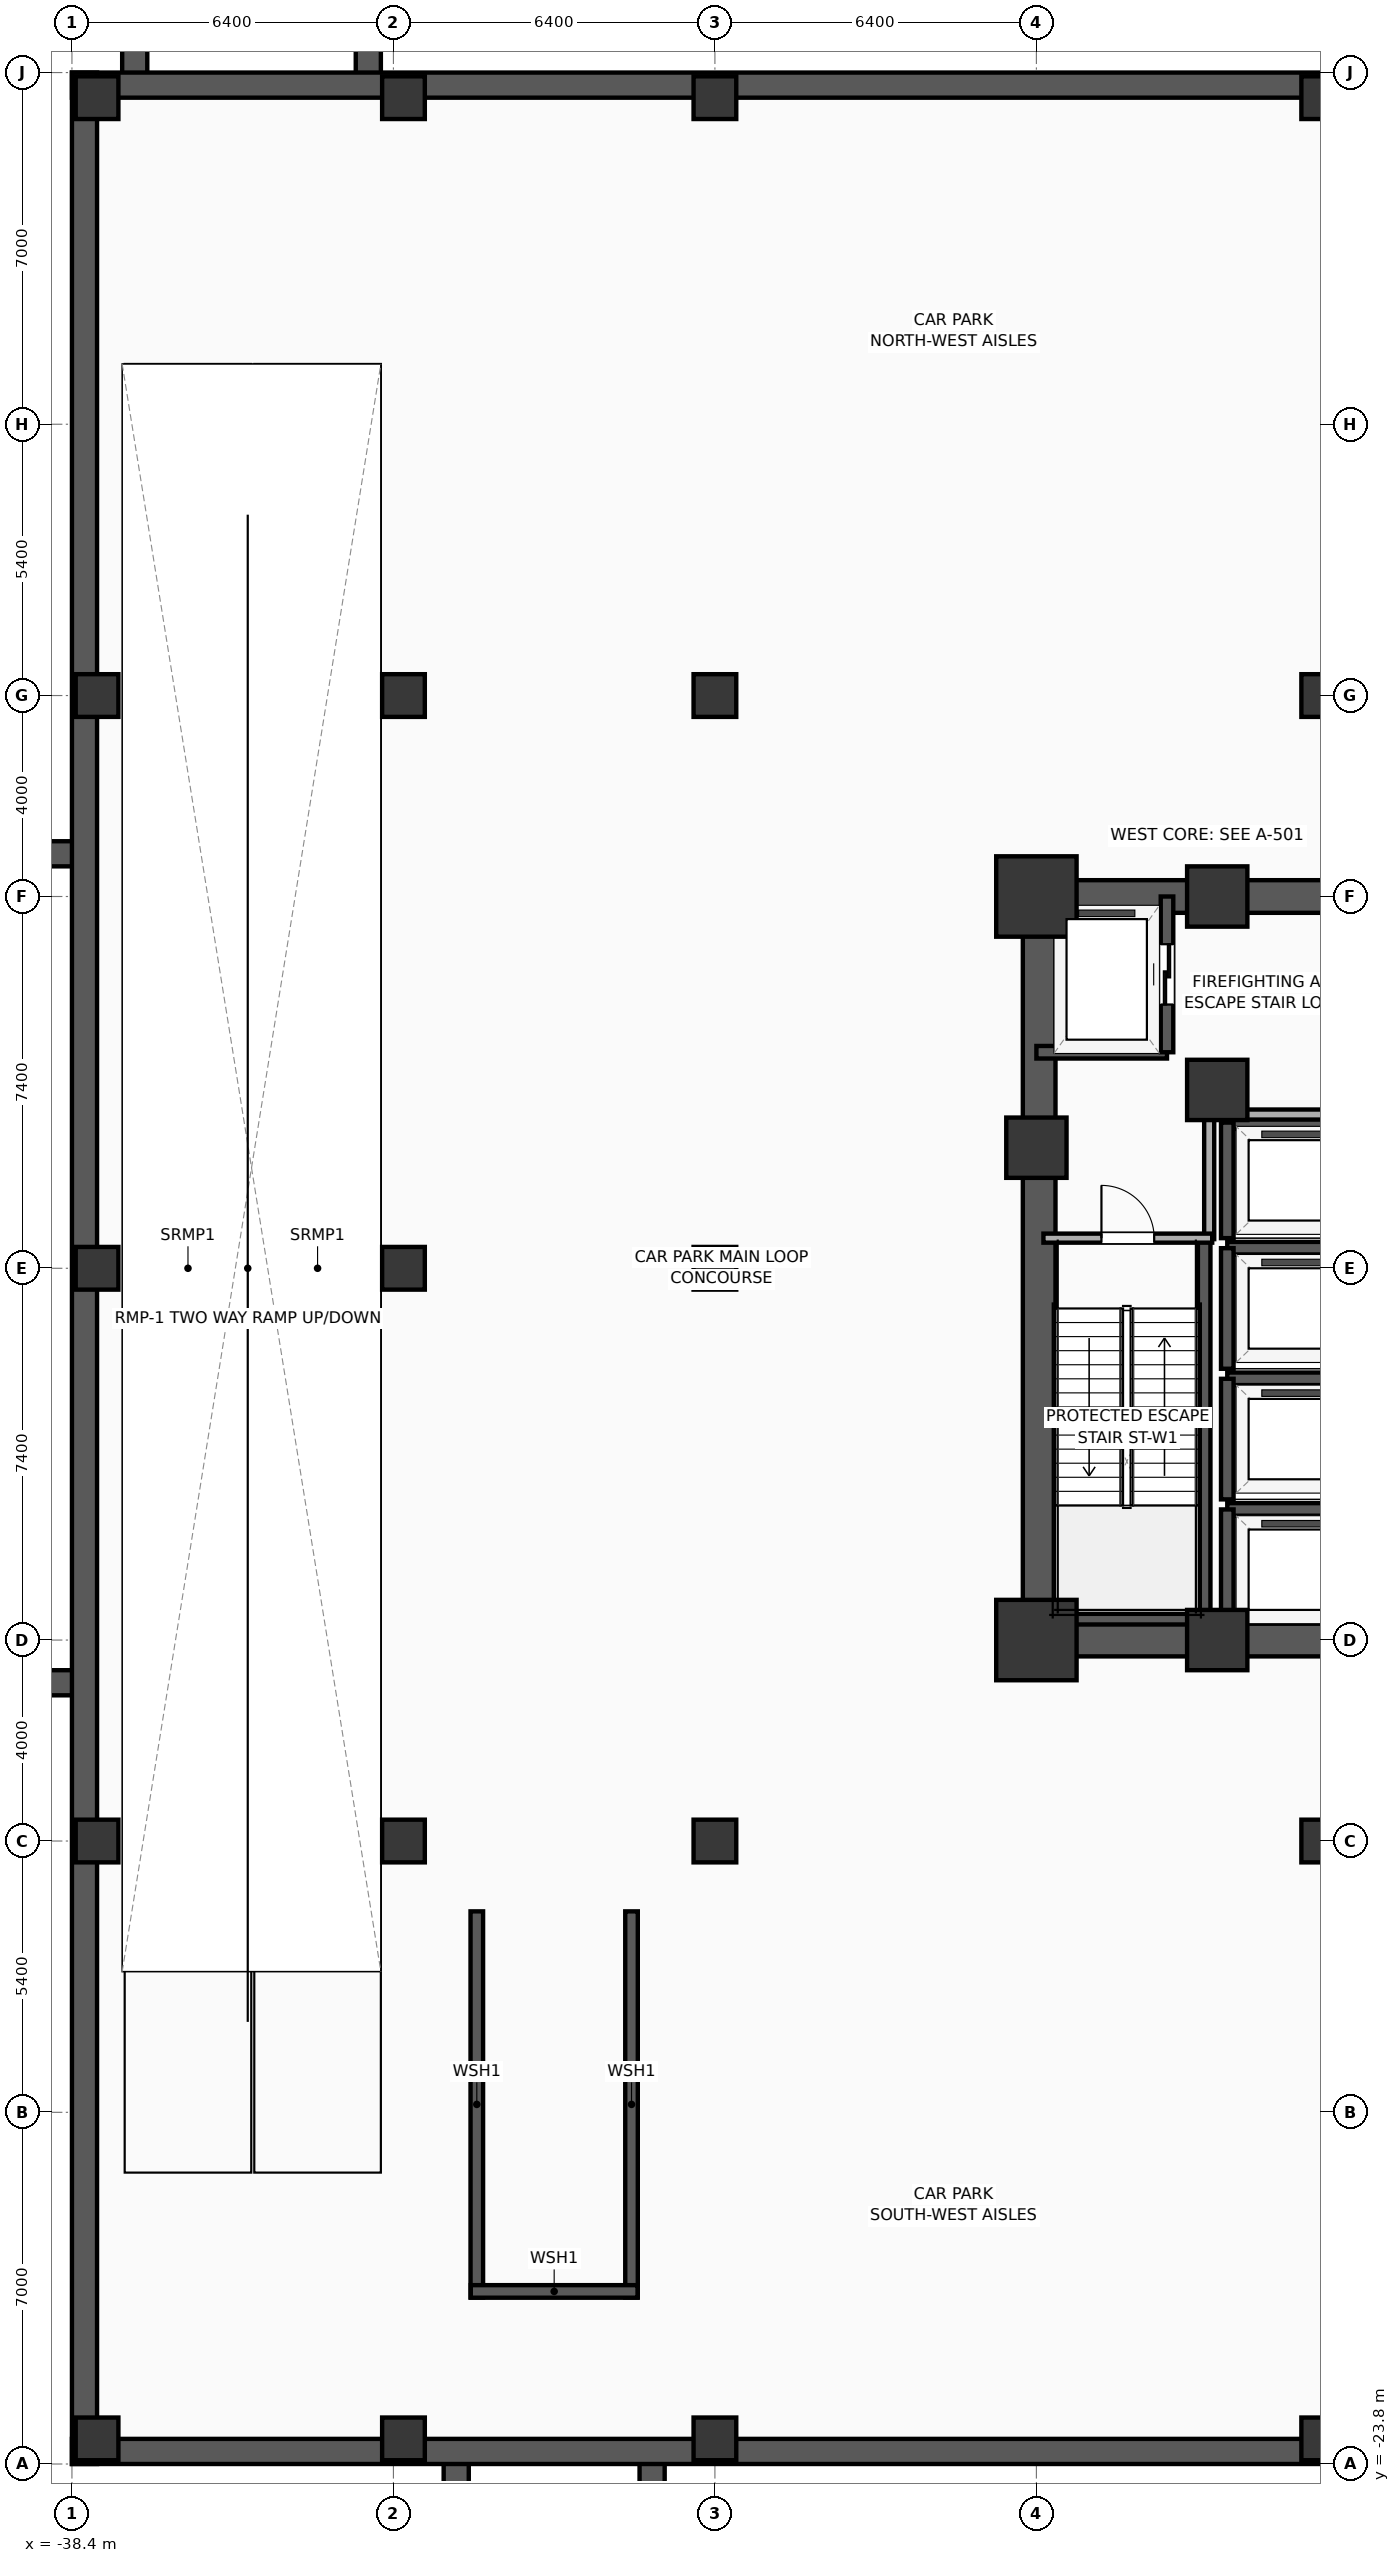
"""IFC4 building model, lengths in metres.
Left out: names, types, materials, properties, quantities, classifications, styles, units other than length and angle.
Written with IfcOpenShell. Run it as: python <this file> out.ifc"""

import sys

from ifc_helpers import new_model, si_unit, direction, frame, frame_2d, origin, origin_2d, place, context, subcontext, project, spatial, rectangle, extrude, element, fill, save


model = new_model("IFC4")
c1 = context("Model", 3, precision=1e-05, world=origin(), true_north=direction((0.0, 1.0)))
c2 = subcontext(c1, "Body", "Model", "MODEL_VIEW")
j1 = project(units=[si_unit("LENGTHUNIT", "METRE"), si_unit("PLANEANGLEUNIT", "RADIAN")], contexts=[c1])
p1 = place(None, origin())
s1 = spatial("IfcSite", under=j1, at=p1, CompositionType="ELEMENT")
p2 = place(p1, origin())
s2 = spatial("IfcBuilding", under=s1, at=p2, CompositionType="ELEMENT")
p3 = place(p2, frame((0.0, 0.0, -5.2)))
s3 = spatial("IfcBuildingStorey", under=s2, at=p3, CompositionType="ELEMENT", Elevation=-5.2)
for number, where, z_axis, x_axis in (
    (1, (-37.15, 23.55, 0.0), (0.0, 0.0, 1.0), (0.0, 1.0, 0.0)),
    (2, (-32.5, 23.55, 0.0), (0.0, 0.0, 1.0), (0.0, 1.0, 0.0)),
):
    element("IfcWall", number, at=place(p3, frame(where, z_axis=z_axis, x_axis=x_axis)), inside=s3, PredefinedType="USERDEFINED", context=c2, shape_type="SweptSolid", body=[
        extrude(rectangle(XDim=3.6, YDim=0.5, at=frame_2d((1.8, 0.0))), origin(), (0.0, 0.0, 1.0), 5.02),
    ])
for number, where, z_axis, x_axis in (
    (3, (-30.75, -26.95, 0.0), (0.0, 0.0, 1.0), (0.0, 1.0, 0.0)),
    (4, (-26.85, -26.95, 0.0), (0.0, 0.0, 1.0), (0.0, 1.0, 0.0)),
):
    element("IfcWall", number, at=place(p3, frame(where, z_axis=z_axis, x_axis=x_axis)), inside=s3, PredefinedType="USERDEFINED", context=c2, shape_type="SweptSolid", body=[
        extrude(rectangle(XDim=3.4, YDim=0.5, at=frame_2d((1.7, 0.0))), origin(), (0.0, 0.0, 1.0), 5.02),
    ])
for number, where, z_axis, x_axis in (
    (5, (-42.35, -8.25, 0.0), (0.0, 0.0, 1.0), (1.0, 0.0, 0.0)),
    (6, (-42.35, 8.25, 0.0), (0.0, 0.0, 1.0), (1.0, 0.0, 0.0)),
):
    element("IfcWall", number, at=place(p3, frame(where, z_axis=z_axis, x_axis=x_axis)), inside=s3, PredefinedType="USERDEFINED", context=c2, shape_type="SweptSolid", body=[
        extrude(rectangle(XDim=4.2, YDim=0.5, at=frame_2d((2.1, 0.0))), origin(), (0.0, 0.0, 1.0), 5.02),
    ])
p4 = place(p3, frame((-19.2, -7.4, 0.0), z_axis=(0.0, 0.0, 1.0), x_axis=(1.0, 0.0, 0.0)))
e7 = element("IfcColumn", 7, at=p4, inside=s3, PredefinedType="COLUMN", context=c2, shape_type="SweptSolid", body=[
    extrude(rectangle(XDim=1.6, YDim=1.6, at=origin_2d()), origin(), (0.0, 0.0, 1.0), 5.2),
])
p5 = place(p3, frame((-19.2, 2.4, 0.0), z_axis=(0.0, 0.0, 1.0), x_axis=(1.0, 0.0, 0.0)))
e8 = element("IfcColumn", 8, at=p5, inside=s3, PredefinedType="COLUMN", context=c2, shape_type="SweptSolid", body=[
    extrude(rectangle(XDim=1.2, YDim=1.2, at=origin_2d()), origin(), (0.0, 0.0, 1.0), 5.2),
])
p6 = place(p3, frame((-19.2, 7.4, 0.0), z_axis=(0.0, 0.0, 1.0), x_axis=(1.0, 0.0, 0.0)))
e9 = element("IfcColumn", 9, at=p6, inside=s3, PredefinedType="COLUMN", context=c2, shape_type="SweptSolid", body=[
    extrude(rectangle(XDim=1.6, YDim=1.6, at=origin_2d()), origin(), (0.0, 0.0, 1.0), 5.2),
])
for number, where, z_axis, x_axis in (
    (10, (-15.6, -7.4, 0.0), (0.0, 0.0, 1.0), (1.0, 0.0, 0.0)),
    (11, (-15.6, 7.4, 0.0), (0.0, 0.0, 1.0), (1.0, 0.0, 0.0)),
    (12, (-15.6, 3.55, 0.0), (0.0, 0.0, 1.0), (1.0, 0.0, 0.0)),
):
    element("IfcColumn", number, at=place(p3, frame(where, z_axis=z_axis, x_axis=x_axis)), inside=s3, PredefinedType="COLUMN", context=c2, shape_type="SweptSolid", body=[
        extrude(rectangle(XDim=1.2, YDim=1.2, at=origin_2d()), origin(), (0.0, 0.0, 1.0), 5.2),
    ])
for number, where, z_axis, x_axis in (
    (13, (-19.525, -7.4, 0.0), (0.0, 0.0, 1.0), (1.0, 0.0, 0.0)),
    (14, (-19.525, 7.4, 0.0), (0.0, 0.0, 1.0), (1.0, 0.0, 0.0)),
):
    element("IfcWall", number, at=place(p3, frame(where, z_axis=z_axis, x_axis=x_axis)), inside=s3, PredefinedType="SHEAR", context=c2, shape_type="SweptSolid", body=[
        extrude(rectangle(XDim=7.45, YDim=0.65, at=frame_2d((3.725, 0.0))), origin(), (0.0, 0.0, 1.0), 4.92),
    ])
p7 = place(p3, frame((-19.145, -7.4, 0.0), z_axis=(0.0, 0.0, 1.0), x_axis=(0.0, 1.0, 0.0)))
e15 = element("IfcWall", 15, at=p7, inside=s3, PredefinedType="SHEAR", context=c2, shape_type="SweptSolid", body=[
    extrude(rectangle(XDim=14.8, YDim=0.65, at=frame_2d((7.4, 0.0))), origin(), (0.0, 0.0, 1.0), 4.92),
])
p8 = place(p3, frame((-15.86, -7.085, 0.0), z_axis=(0.0, 0.0, 1.0), x_axis=(0.0, 1.0, 0.0)))
e16 = element("IfcWall", 16, at=p8, inside=s3, PredefinedType="SOLIDWALL", context=c2, shape_type="SweptSolid", body=[
    extrude(rectangle(XDim=7.685, YDim=0.25, at=frame_2d((3.843, 0.0))), origin(), (0.0, 0.0, 1.0), 4.92),
])
p9 = place(p3, frame((-19.2, -6.965, 0.0), z_axis=(0.0, 0.0, 1.0), x_axis=(1.0, 0.0, 0.0)))
e17 = element("IfcWall", 17, at=p9, inside=s3, PredefinedType="SOLIDWALL", context=c2, shape_type="SweptSolid", body=[
    extrude(rectangle(XDim=3.46, YDim=0.25, at=frame_2d((1.73, 0.0))), origin(), (0.0, 0.0, 1.0), 4.92),
])
for number, where, z_axis, x_axis in (
    (18, (-30.34, -20.485, 0.0), (0.0, 0.0, 1.0), (0.0, 1.0, 0.0)),
    (19, (-27.26, -20.485, 0.0), (0.0, 0.0, 1.0), (0.0, 1.0, 0.0)),
):
    element("IfcWall", number, at=place(p3, frame(where, z_axis=z_axis, x_axis=x_axis)), inside=s3, PredefinedType="SOLIDWALL", context=c2, shape_type="SweptSolid", body=[
        extrude(rectangle(XDim=7.685, YDim=0.25, at=frame_2d((3.843, 0.0))), origin(), (0.0, 0.0, 1.0), 4.92),
    ])
p10 = place(p3, frame((-30.46, -20.365, 0.0), z_axis=(0.0, 0.0, 1.0), x_axis=(1.0, 0.0, 0.0)))
e20 = element("IfcWall", 20, at=p10, inside=s3, PredefinedType="SOLIDWALL", context=c2, shape_type="SweptSolid", body=[
    extrude(rectangle(XDim=3.32, YDim=0.25, at=frame_2d((1.66, 0.0))), origin(), (0.0, 0.0, 1.0), 4.92),
])
for number, where, z_axis, x_axis in (
    (21, (-38.4, -23.55, 0.0), (0.0, 0.0, 1.0), (1.0, 0.0, 0.0)),
    (22, (-38.4, 23.55, 0.0), (0.0, 0.0, 1.0), (1.0, 0.0, 0.0)),
):
    element("IfcWall", number, at=place(p3, frame(where, z_axis=z_axis, x_axis=x_axis)), inside=s3, PredefinedType="USERDEFINED", context=c2, shape_type="SweptSolid", body=[
        extrude(rectangle(XDim=74.0, YDim=0.5, at=frame_2d((37.0, 0.0))), origin(), (0.0, 0.0, 1.0), 4.92),
    ])
p11 = place(p3, frame((-38.15, -23.8, 0.0), z_axis=(0.0, 0.0, 1.0), x_axis=(0.0, 1.0, 0.0)))
e23 = element("IfcWall", 23, at=p11, inside=s3, PredefinedType="USERDEFINED", context=c2, shape_type="SweptSolid", body=[
    extrude(rectangle(XDim=47.6, YDim=0.5, at=frame_2d((23.8, 0.0))), origin(), (0.0, 0.0, 1.0), 4.92),
])
for number, where, z_axis, x_axis in (
    (24, (-37.9, -23.3, 0.0), (0.0, 0.0, 1.0), (1.0, 0.0, 0.0)),
    (25, (-37.9, -11.4, 0.0), (0.0, 0.0, 1.0), (1.0, 0.0, 0.0)),
    (26, (-37.9, 0.0, 0.0), (0.0, 0.0, 1.0), (1.0, 0.0, 0.0)),
    (27, (-37.9, 11.4, 0.0), (0.0, 0.0, 1.0), (1.0, 0.0, 0.0)),
    (28, (-37.9, 23.3, 0.0), (0.0, 0.0, 1.0), (1.0, 0.0, 0.0)),
    (29, (-31.8, -23.3, 0.0), (0.0, 0.0, 1.0), (1.0, 0.0, 0.0)),
    (30, (-31.8, -11.4, 0.0), (0.0, 0.0, 1.0), (1.0, 0.0, 0.0)),
    (31, (-31.8, 0.0, 0.0), (0.0, 0.0, 1.0), (1.0, 0.0, 0.0)),
    (32, (-31.8, 11.4, 0.0), (0.0, 0.0, 1.0), (1.0, 0.0, 0.0)),
    (33, (-31.8, 23.3, 0.0), (0.0, 0.0, 1.0), (1.0, 0.0, 0.0)),
    (34, (-25.6, -23.3, 0.0), (0.0, 0.0, 1.0), (1.0, 0.0, 0.0)),
    (35, (-25.6, -11.4, 0.0), (0.0, 0.0, 1.0), (1.0, 0.0, 0.0)),
    (36, (-25.6, 0.0, 0.0), (0.0, 0.0, 1.0), (1.0, 0.0, 0.0)),
    (37, (-25.6, 11.4, 0.0), (0.0, 0.0, 1.0), (1.0, 0.0, 0.0)),
    (38, (-25.6, 23.3, 0.0), (0.0, 0.0, 1.0), (1.0, 0.0, 0.0)),
    (39, (-13.5, -23.3, 0.0), (0.0, 0.0, 1.0), (1.0, 0.0, 0.0)),
    (40, (-13.5, -11.4, 0.0), (0.0, 0.0, 1.0), (1.0, 0.0, 0.0)),
    (41, (-13.5, 11.4, 0.0), (0.0, 0.0, 1.0), (1.0, 0.0, 0.0)),
    (42, (-13.5, 23.3, 0.0), (0.0, 0.0, 1.0), (1.0, 0.0, 0.0)),
):
    element("IfcColumn", number, at=place(p3, frame(where, z_axis=z_axis, x_axis=x_axis)), inside=s3, PredefinedType="COLUMN", context=c2, shape_type="SweptSolid", body=[
        extrude(rectangle(XDim=0.85, YDim=0.85, at=origin_2d()), origin(), (0.0, 0.0, 1.0), 5.2),
    ])
p12 = place(p3, frame((-19.2, 4.3, 0.0), z_axis=(0.0, 0.0, 1.0), x_axis=(1.0, 0.0, 0.0)))
e43 = element("IfcWall", 43, at=p12, inside=s3, PredefinedType="SOLIDWALL", context=c2, shape_type="SweptSolid", body=[
    extrude(rectangle(XDim=2.6, YDim=0.25, at=frame_2d((1.3, 0.0))), origin(), (0.0, 0.0, 1.0), 4.92),
])
p13 = place(p3, frame((-16.6, 4.3, 0.0), z_axis=(0.0, 0.0, 1.0), x_axis=(0.0, 1.0, 0.0)))
e44 = element("IfcWall", 44, at=p13, inside=s3, PredefinedType="SOLIDWALL", context=c2, shape_type="SweptSolid", body=[
    extrude(rectangle(XDim=3.1, YDim=0.25, at=frame_2d((1.55, 0.0))), origin(), (0.0, 0.0, 1.0), 4.92),
])
p14 = place(p13, frame((0.95, 0.0, 0.0)))
e45 = element("IfcOpeningElement", 45, at=p14, cuts=e44, PredefinedType="OPENING", context=c2, shape_type="SweptSolid", body=[
    extrude(rectangle(XDim=1.2, YDim=2.05, at=frame_2d((0.6, 1.025))), frame((0.0, 0.135, 0.0), z_axis=(0.0, -1.0, 0.0), x_axis=(1.0, 0.0, 0.0)), (0.0, 0.0, 1.0), 0.27),
])
p15 = place(p3, frame((-12.4, -4.8, 0.0), z_axis=(0.0, 0.0, 1.0), x_axis=(-1.0, 0.0, 0.0)))
e46 = element("IfcWall", 46, at=p15, inside=s3, PredefinedType="SOLIDWALL", context=c2, shape_type="SweptSolid", body=[
    extrude(rectangle(XDim=3.0, YDim=0.25, at=frame_2d((1.5, 0.0))), origin(), (0.0, 0.0, 1.0), 4.92),
])
p16 = place(p3, frame((-15.4, -4.8, 0.0), z_axis=(0.0, 0.0, 1.0), x_axis=(0.0, -1.0, 0.0)))
e47 = element("IfcWall", 47, at=p16, inside=s3, PredefinedType="SOLIDWALL", context=c2, shape_type="SweptSolid", body=[
    extrude(rectangle(XDim=2.6, YDim=0.25, at=frame_2d((1.3, 0.0))), origin(), (0.0, 0.0, 1.0), 4.92),
])
p17 = place(p3, frame((-12.4, -2.2, 0.0), z_axis=(0.0, 0.0, 1.0), x_axis=(-1.0, 0.0, 0.0)))
e48 = element("IfcWall", 48, at=p17, inside=s3, PredefinedType="SOLIDWALL", context=c2, shape_type="SweptSolid", body=[
    extrude(rectangle(XDim=3.0, YDim=0.25, at=frame_2d((1.5, 0.0))), origin(), (0.0, 0.0, 1.0), 4.92),
])
p18 = place(p3, frame((-15.4, -2.2, 0.0), z_axis=(0.0, 0.0, 1.0), x_axis=(0.0, -1.0, 0.0)))
e49 = element("IfcWall", 49, at=p18, inside=s3, PredefinedType="SOLIDWALL", context=c2, shape_type="SweptSolid", body=[
    extrude(rectangle(XDim=2.4, YDim=0.25, at=frame_2d((1.2, 0.0))), origin(), (0.0, 0.0, 1.0), 4.92),
])
p19 = place(p3, frame((-12.4, 0.4, 0.0), z_axis=(0.0, 0.0, 1.0), x_axis=(-1.0, 0.0, 0.0)))
e50 = element("IfcWall", 50, at=p19, inside=s3, PredefinedType="SOLIDWALL", context=c2, shape_type="SweptSolid", body=[
    extrude(rectangle(XDim=3.0, YDim=0.25, at=frame_2d((1.5, 0.0))), origin(), (0.0, 0.0, 1.0), 4.92),
])
p20 = place(p3, frame((-15.4, 0.4, 0.0), z_axis=(0.0, 0.0, 1.0), x_axis=(0.0, -1.0, 0.0)))
e51 = element("IfcWall", 51, at=p20, inside=s3, PredefinedType="SOLIDWALL", context=c2, shape_type="SweptSolid", body=[
    extrude(rectangle(XDim=2.4, YDim=0.25, at=frame_2d((1.2, 0.0))), origin(), (0.0, 0.0, 1.0), 4.92),
])
p21 = place(p3, frame((-12.4, 2.9, 0.0), z_axis=(0.0, 0.0, 1.0), x_axis=(-1.0, 0.0, 0.0)))
e52 = element("IfcWall", 52, at=p21, inside=s3, PredefinedType="SOLIDWALL", context=c2, shape_type="SweptSolid", body=[
    extrude(rectangle(XDim=3.0, YDim=0.25, at=frame_2d((1.5, 0.0))), origin(), (0.0, 0.0, 1.0), 4.92),
])
p22 = place(p3, frame((-15.4, 2.9, 0.0), z_axis=(0.0, 0.0, 1.0), x_axis=(0.0, -1.0, 0.0)))
e53 = element("IfcWall", 53, at=p22, inside=s3, PredefinedType="SOLIDWALL", context=c2, shape_type="SweptSolid", body=[
    extrude(rectangle(XDim=2.3, YDim=0.25, at=frame_2d((1.15, 0.0))), origin(), (0.0, 0.0, 1.0), 4.92),
])
p23 = place(p3, frame((-15.76, 0.58, 0.0), z_axis=(0.0, 0.0, 1.0), x_axis=(0.0, 1.0, 0.0)))
e54 = element("IfcWall", 54, at=p23, inside=s3, PredefinedType="PARTITIONING", context=c2, shape_type="SweptSolid", body=[
    extrude(rectangle(XDim=2.52, YDim=0.2, at=frame_2d((1.26, 0.0))), origin(), (0.0, 0.0, 1.0), 4.92),
])
p24 = place(p3, frame((-15.82, 3.06, 0.0), z_axis=(0.0, 0.0, 1.0), x_axis=(1.0, 0.0, 0.0)))
e55 = element("IfcWall", 55, at=p24, inside=s3, PredefinedType="PARTITIONING", context=c2, shape_type="SweptSolid", body=[
    extrude(rectangle(XDim=3.16, YDim=0.2, at=frame_2d((1.58, 0.0))), origin(), (0.0, 0.0, 1.0), 4.92),
])
p25 = place(p3, frame((-19.06, 0.6, 0.0), z_axis=(0.0, 0.0, 1.0), x_axis=(1.0, 0.0, 0.0)))
e56 = element("IfcWall", 56, at=p25, inside=s3, PredefinedType="PARTITIONING", context=c2, shape_type="SweptSolid", body=[
    extrude(rectangle(XDim=3.36, YDim=0.18, at=frame_2d((1.68, 0.0))), origin(), (0.0, 0.0, 1.0), 4.92),
])
p26 = place(p25, frame((1.155, 0.0, 0.0)))
e57 = element("IfcOpeningElement", 57, at=p26, cuts=e56, PredefinedType="OPENING", context=c2, shape_type="SweptSolid", body=[
    extrude(rectangle(XDim=1.05, YDim=2.05, at=frame_2d((0.525, 1.025))), frame((0.0, 0.1, 0.0), z_axis=(0.0, -1.0, 0.0), x_axis=(1.0, 0.0, 0.0)), (0.0, 0.0, 1.0), 0.2),
])
p27 = place(p14, origin())
e58 = element("IfcDoor", 58, at=p27, inside=s3, OperationType="SLIDING_TO_LEFT", PredefinedType="DOOR", context=c2, shape_type="SweptSolid", body=[
    extrude(rectangle(XDim=1.2, YDim=2.05, at=frame_2d((0.6, 1.025))), frame((0.0, 0.025, 0.0), z_axis=(0.0, -1.0, 0.0), x_axis=(1.0, 0.0, 0.0)), (0.0, 0.0, 1.0), 0.05),
])
fill(e45, e58)
p28 = place(p26, origin())
e59 = element("IfcDoor", 59, at=p28, inside=s3, OperationType="SINGLE_SWING_LEFT", PredefinedType="DOOR", context=c2, shape_type="SweptSolid", body=[
    extrude(rectangle(XDim=1.05, YDim=2.05, at=frame_2d((0.525, 1.025))), frame((0.0, 0.025, 0.0), z_axis=(0.0, -1.0, 0.0), x_axis=(1.0, 0.0, 0.0)), (0.0, 0.0, 1.0), 0.05),
])
fill(e57, e59)
save(model, sys.argv[1])
